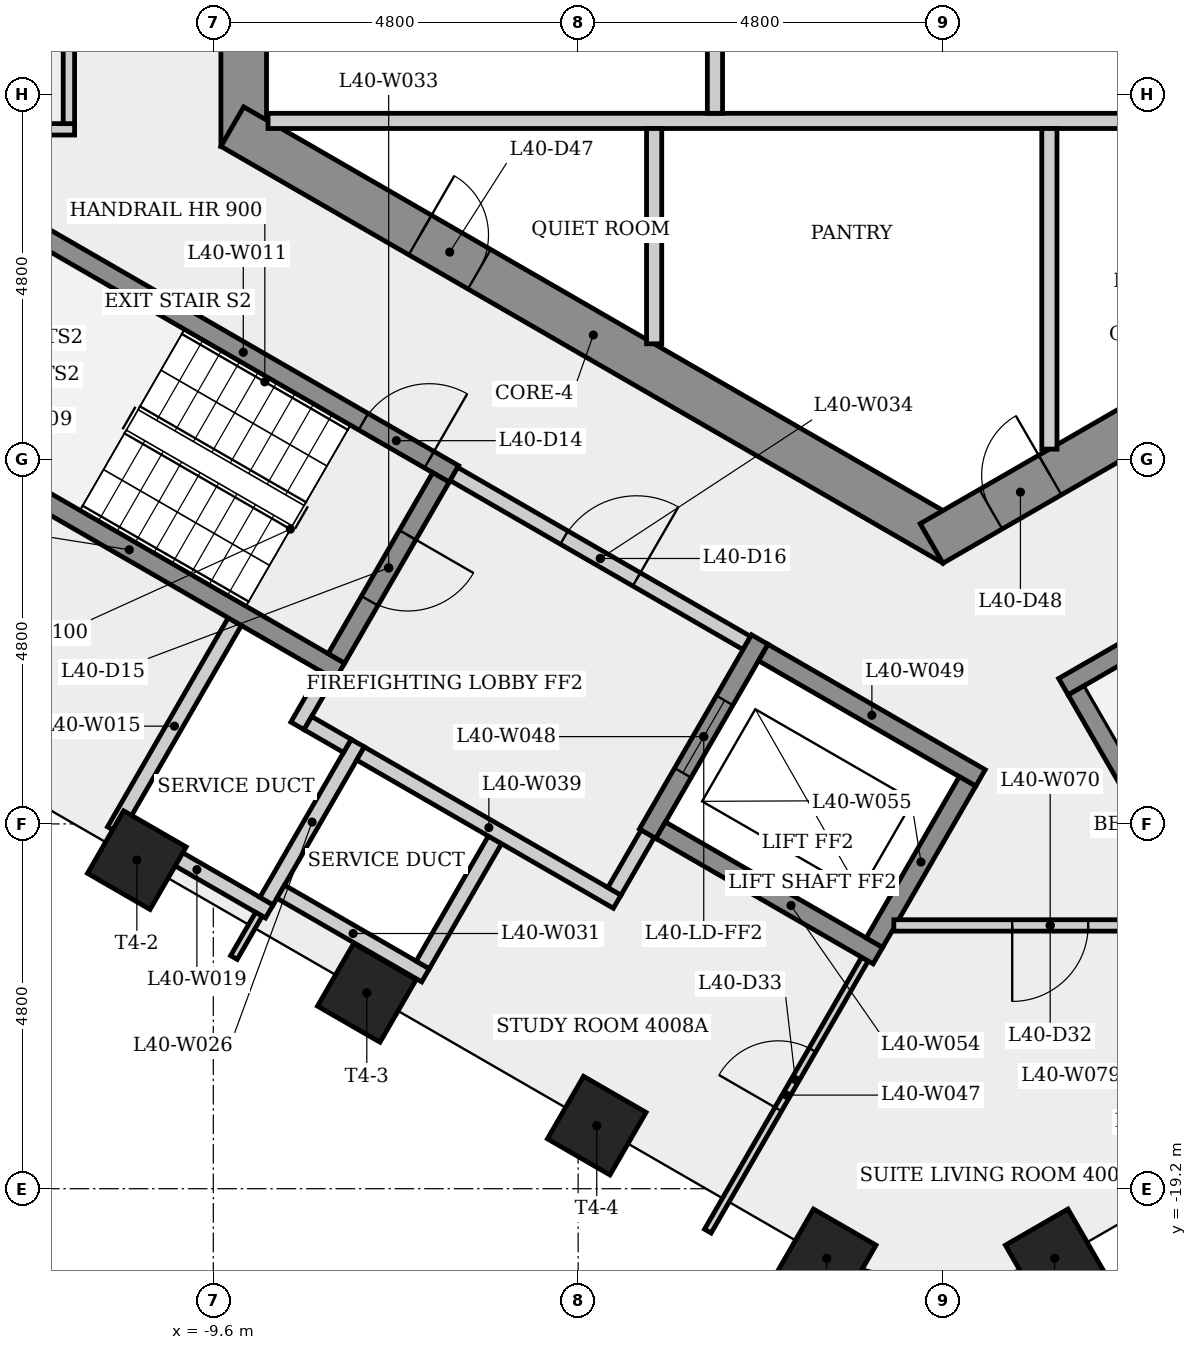
"""IFC4 building model, lengths in metres.
Left out: names, types, materials, properties, quantities, classifications, styles, units other than length and angle.
Written with IfcOpenShell. Run it as: python <this file> out.ifc"""

import sys

from ifc_helpers import new_model, si_unit, direction, frame, frame_2d, origin, origin_2d, place, context, subcontext, project, spatial, rectangle, extrude, element, fill, save


model = new_model("IFC4")
c1 = context("Model", 3, precision=1e-05, world=origin(), true_north=direction((0.0, 1.0)))
c2 = subcontext(c1, "Body", "Model", "MODEL_VIEW")
j1 = project(units=[si_unit("LENGTHUNIT", "METRE"), si_unit("PLANEANGLEUNIT", "RADIAN")], contexts=[c1])
p1 = place(None, origin())
s1 = spatial("IfcSite", under=j1, at=p1, CompositionType="ELEMENT")
p2 = place(p1, origin())
s2 = spatial("IfcBuilding", under=s1, at=p2, CompositionType="ELEMENT")
p3 = place(p2, frame((0.0, 0.0, 152.7)))
s3 = spatial("IfcBuildingStorey", under=s2, at=p3, CompositionType="ELEMENT", Elevation=152.7)
p4 = place(p3, frame((-9.2, 5.485, 0.0), z_axis=(0.0, 0.0, 1.0), x_axis=(0.0, -1.0, 0.0)))
e1 = element("IfcWall", 1, at=p4, inside=s3, PredefinedType="SHEAR", context=c2, shape_type="SweptSolid", body=[
    extrude(rectangle(XDim=10.97, YDim=0.6, at=frame_2d((5.485, 0.0))), origin(), (0.0, 0.0, 1.0), 3.4),
])
p5 = place(p4, frame((8.516, 0.0, 0.0)))
e2 = element("IfcOpeningElement", 2, at=p5, cuts=e1, PredefinedType="OPENING", context=c2, shape_type="SweptSolid", body=[
    extrude(rectangle(XDim=0.9, YDim=2.1, at=frame_2d((0.45, 1.05))), frame((0.0, 0.31, 0.0), z_axis=(0.0, -1.0, 0.0), x_axis=(1.0, 0.0, 0.0)), (0.0, 0.0, 1.0), 0.62),
])
p6 = place(p4, frame((4.685, 0.0, 0.0)))
e3 = element("IfcOpeningElement", 3, at=p6, cuts=e1, PredefinedType="OPENING", context=c2, shape_type="SweptSolid", body=[
    extrude(rectangle(XDim=1.6, YDim=2.1, at=frame_2d((0.8, 1.05))), frame((0.0, 0.31, 0.0), z_axis=(0.0, -1.0, 0.0), x_axis=(1.0, 0.0, 0.0)), (0.0, 0.0, 1.0), 0.62),
])
p7 = place(p3, frame((-9.35, -5.225, 0.0), z_axis=(0.0, 0.0, 1.0), x_axis=(0.866023993627, -0.500002442456, 0.0)))
e4 = element("IfcWall", 4, at=p7, inside=s3, PredefinedType="SHEAR", context=c2, shape_type="SweptSolid", body=[
    extrude(rectangle(XDim=10.97, YDim=0.6, at=frame_2d((5.485, 0.0))), origin(), (0.0, 0.0, 1.0), 3.4),
])
p8 = place(p7, frame((2.853, 0.0, 0.0)))
e5 = element("IfcOpeningElement", 5, at=p8, cuts=e4, PredefinedType="OPENING", context=c2, shape_type="SweptSolid", body=[
    extrude(rectangle(XDim=0.9, YDim=2.1, at=frame_2d((0.45, 1.05))), frame((0.0, 0.31, 0.0), z_axis=(0.0, -1.0, 0.0), x_axis=(1.0, 0.0, 0.0)), (0.0, 0.0, 1.0), 0.62),
])
p9 = place(p3, frame((-0.15, -10.71, 0.0), z_axis=(0.0, 0.0, 1.0), x_axis=(0.866023993627, 0.500002442456, 0.0)))
e6 = element("IfcWall", 6, at=p9, inside=s3, PredefinedType="SHEAR", context=c2, shape_type="SweptSolid", body=[
    extrude(rectangle(XDim=10.97, YDim=0.6, at=frame_2d((5.485, 0.0))), origin(), (0.0, 0.0, 1.0), 3.4),
])
p10 = place(p9, frame((0.9, 0.0, 0.0)))
e7 = element("IfcOpeningElement", 7, at=p10, cuts=e6, PredefinedType="OPENING", context=c2, shape_type="SweptSolid", body=[
    extrude(rectangle(XDim=0.9, YDim=2.1, at=frame_2d((0.45, 1.05))), frame((0.0, 0.31, 0.0), z_axis=(0.0, -1.0, 0.0), x_axis=(1.0, 0.0, 0.0)), (0.0, 0.0, 1.0), 0.62),
])
p11 = place(p9, frame((7.512, 0.0, 0.0)))
e8 = element("IfcOpeningElement", 8, at=p11, cuts=e6, PredefinedType="OPENING", context=c2, shape_type="SweptSolid", body=[
    extrude(rectangle(XDim=0.9, YDim=2.1, at=frame_2d((0.45, 1.05))), frame((0.0, 0.31, 0.0), z_axis=(0.0, -1.0, 0.0), x_axis=(1.0, 0.0, 0.0)), (0.0, 0.0, 1.0), 0.62),
])
for number, where, z_axis, x_axis in (
    (9, (-10.606, -14.877, 0.0), (0.0, 0.0, 1.0), (-0.5, -0.866, 0.0)),
    (10, (-7.581, -16.623, 0.0), (0.0, 0.0, 1.0), (-0.5, -0.866, 0.0)),
    (11, (-4.555, -18.37, 0.0), (0.0, 0.0, 1.0), (-0.5, -0.866, 0.0)),
    (12, (-1.53, -20.117, 0.0), (0.0, 0.0, 1.0), (-0.5, -0.866, 0.0)),
    (13, (1.47, -20.117, 0.0), (0.0, 0.0, 1.0), (0.5, -0.866, 0.0)),
):
    element("IfcColumn", number, at=place(p3, frame(where, z_axis=z_axis, x_axis=x_axis)), inside=s3, PredefinedType="COLUMN", context=c2, shape_type="SweptSolid", body=[
        extrude(rectangle(XDim=0.95, YDim=0.95, at=origin_2d()), origin(), (0.0, 0.0, 1.0), 3.4),
    ])
p12 = place(p3, frame((-15.901, -5.261, 0.0), z_axis=(0.0, 0.0, 1.0), x_axis=(1.0, 0.0, 0.0)))
e14 = element("IfcWall", 14, at=p12, inside=s3, PredefinedType="PARTITIONING", context=c2, shape_type="SweptSolid", body=[
    extrude(rectangle(XDim=4.476, YDim=0.15, at=frame_2d((2.238, 0.0))), origin(), (0.0, 0.0, 1.0), 3.05),
])
p13 = place(p3, frame((-11.977, -6.595, 0.0), z_axis=(0.0, 0.0, 1.0), x_axis=(0.866025499775, -0.499999833739, 0.0)))
e15 = element("IfcWall", 15, at=p13, inside=s3, PredefinedType="SHEAR", context=c2, shape_type="SweptSolid", body=[
    extrude(rectangle(XDim=6.4, YDim=0.25, at=frame_2d((3.2, 0.0))), origin(), (0.0, 0.0, 1.0), 3.05),
])
p14 = place(p13, frame((5.025, 0.0, 0.0)))
e16 = element("IfcOpeningElement", 16, at=p14, cuts=e15, PredefinedType="OPENING", context=c2, shape_type="SweptSolid", body=[
    extrude(rectangle(XDim=1.0, YDim=2.1, at=frame_2d((0.5, 1.05))), frame((0.0, 0.135, 0.0), z_axis=(0.0, -1.0, 0.0), x_axis=(1.0, 0.0, 0.0)), (0.0, 0.0, 1.0), 0.27),
])
p15 = place(p3, frame((-11.5, -5.186, 0.0), z_axis=(0.0, 0.0, 1.0), x_axis=(0.0, 1.0, 0.0)))
e17 = element("IfcWall", 17, at=p15, inside=s3, PredefinedType="PARTITIONING", context=c2, shape_type="SweptSolid", body=[
    extrude(rectangle(XDim=10.521, YDim=0.15, at=frame_2d((5.261, 0.0))), origin(), (0.0, 0.0, 1.0), 3.05),
])
p16 = place(p15, frame((9.146, 0.0, 0.0)))
e18 = element("IfcOpeningElement", 18, at=p16, cuts=e17, PredefinedType="OPENING", context=c2, shape_type="SweptSolid", body=[
    extrude(rectangle(XDim=0.9, YDim=2.1, at=frame_2d((0.45, 1.05))), frame((0.0, 0.085, 0.0), z_axis=(0.0, -1.0, 0.0), x_axis=(1.0, 0.0, 0.0)), (0.0, 0.0, 1.0), 0.17),
])
p17 = place(p15, frame((2.955, 0.0, 0.0)))
e19 = element("IfcOpeningElement", 19, at=p17, cuts=e17, PredefinedType="OPENING", context=c2, shape_type="SweptSolid", body=[
    extrude(rectangle(XDim=1.0, YDim=2.1, at=frame_2d((0.5, 1.05))), frame((0.0, 0.085, 0.0), z_axis=(0.0, -1.0, 0.0), x_axis=(1.0, 0.0, 0.0)), (0.0, 0.0, 1.0), 0.17),
])
p18 = place(p3, frame((-10.905, -14.489, 0.0), z_axis=(0.0, 0.0, 1.0), x_axis=(0.499959856469, 0.866048579423, 0.0)))
e20 = element("IfcWall", 20, at=p18, inside=s3, PredefinedType="PLUMBINGWALL", context=c2, shape_type="SweptSolid", body=[
    extrude(rectangle(XDim=3.175, YDim=0.2, at=frame_2d((1.587, 0.0))), origin(), (0.0, 0.0, 1.0), 3.05),
])
p19 = place(p3, frame((-13.477, -9.193, 0.0), z_axis=(0.0, 0.0, 1.0), x_axis=(0.866025499775, -0.499999833739, 0.0)))
e21 = element("IfcWall", 21, at=p19, inside=s3, PredefinedType="SHEAR", context=c2, shape_type="SweptSolid", body=[
    extrude(rectangle(XDim=6.4, YDim=0.25, at=frame_2d((3.2, 0.0))), origin(), (0.0, 0.0, 1.0), 3.05),
])
p20 = place(p3, frame((-8.863, -15.552, 0.0), z_axis=(0.0, 0.0, 1.0), x_axis=(-0.866035918664, 0.499981787252, 0.0)))
e22 = element("IfcWall", 22, at=p20, inside=s3, PredefinedType="PLUMBINGWALL", context=c2, shape_type="SweptSolid", body=[
    extrude(rectangle(XDim=2.2, YDim=0.2, at=frame_2d((1.1, 0.0))), origin(), (0.0, 0.0, 1.0), 3.05),
])
p21 = place(p3, frame((-9.0, -15.588, 0.0), z_axis=(0.0, 0.0, 1.0), x_axis=(-0.500011643316, -0.866018681408, 0.0)))
e23 = element("IfcWall", 23, at=p21, inside=s3, PredefinedType="PARTITIONING", context=c2, shape_type="SweptSolid", body=[
    extrude(rectangle(XDim=0.658, YDim=0.1, at=frame_2d((0.329, 0.0))), origin(), (0.0, 0.0, 1.0), 3.05),
])
p22 = place(p3, frame((-8.88, -5.15, 0.0), z_axis=(0.0, 0.0, 1.0), x_axis=(1.0, 0.0, 0.0)))
e24 = element("IfcWall", 24, at=p22, inside=s3, PredefinedType="PARTITIONING", context=c2, shape_type="SweptSolid", body=[
    extrude(rectangle(XDim=11.205, YDim=0.2, at=frame_2d((5.603, 0.0))), origin(), (0.0, 0.0, 1.0), 3.05),
])
p23 = place(p3, frame((-8.493, -13.11, 0.0), z_axis=(0.0, 0.0, 1.0), x_axis=(0.500067724834, 0.865986299303, 0.0)))
e25 = element("IfcWall", 25, at=p23, inside=s3, PredefinedType="PLUMBINGWALL", context=c2, shape_type="SweptSolid", body=[
    extrude(rectangle(XDim=0.775, YDim=0.2, at=frame_2d((0.388, 0.0))), origin(), (0.0, 0.0, 1.0), 3.05),
])
p24 = place(p3, frame((-7.7, -13.337, 0.0), z_axis=(0.0, 0.0, 1.0), x_axis=(-0.500001309137, -0.866024647952, 0.0)))
e26 = element("IfcWall", 26, at=p24, inside=s3, PredefinedType="PLUMBINGWALL", context=c2, shape_type="SweptSolid", body=[
    extrude(rectangle(XDim=2.4, YDim=0.2, at=frame_2d((1.2, 0.0))), origin(), (0.0, 0.0, 1.0), 3.05),
])
p25 = place(p3, frame((-7.836, -13.373, 0.0), z_axis=(0.0, 0.0, 1.0), x_axis=(-0.866232998003, 0.499640263761, 0.0)))
e27 = element("IfcWall", 27, at=p25, inside=s3, PredefinedType="PLUMBINGWALL", context=c2, shape_type="SweptSolid", body=[
    extrude(rectangle(XDim=0.6, YDim=0.2, at=frame_2d((0.3, 0.0))), origin(), (0.0, 0.0, 1.0), 3.05),
])
p26 = place(p3, frame((-6.808, -16.392, 0.0), z_axis=(0.0, 0.0, 1.0), x_axis=(-0.866008176907, 0.50002983664, 0.0)))
e28 = element("IfcWall", 28, at=p26, inside=s3, PredefinedType="PLUMBINGWALL", context=c2, shape_type="SweptSolid", body=[
    extrude(rectangle(XDim=2.2, YDim=0.2, at=frame_2d((1.1, 0.0))), origin(), (0.0, 0.0, 1.0), 3.05),
])
p27 = place(p3, frame((-6.605, -9.841, 0.0), z_axis=(0.0, 0.0, 1.0), x_axis=(-0.499996545922, -0.866027397988, 0.0)))
e29 = element("IfcWall", 29, at=p27, inside=s3, PredefinedType="SHEAR", context=c2, shape_type="SweptSolid", body=[
    extrude(rectangle(XDim=2.75, YDim=0.25, at=frame_2d((1.375, 0.0))), origin(), (0.0, 0.0, 1.0), 3.05),
])
p28 = place(p27, frame((0.875, 0.0, 0.0)))
e30 = element("IfcOpeningElement", 30, at=p28, cuts=e29, PredefinedType="OPENING", context=c2, shape_type="SweptSolid", body=[
    extrude(rectangle(XDim=1.0, YDim=2.1, at=frame_2d((0.5, 1.05))), frame((0.0, 0.135, 0.0), z_axis=(0.0, -1.0, 0.0), x_axis=(1.0, 0.0, 0.0)), (0.0, 0.0, 1.0), 0.27),
])
p29 = place(p3, frame((-6.435, -9.795, 0.0), z_axis=(0.0, 0.0, 1.0), x_axis=(0.866012907634, -0.500021643343, 0.0)))
e31 = element("IfcWall", 31, at=p29, inside=s3, PredefinedType="PARTITIONING", context=c2, shape_type="SweptSolid", body=[
    extrude(rectangle(XDim=4.45, YDim=0.2, at=frame_2d((2.225, 0.0))), origin(), (0.0, 0.0, 1.0), 3.05),
])
p30 = place(p29, frame((1.675, 0.0, 0.0)))
e32 = element("IfcOpeningElement", 32, at=p30, cuts=e31, PredefinedType="OPENING", context=c2, shape_type="SweptSolid", body=[
    extrude(rectangle(XDim=1.1, YDim=2.1, at=frame_2d((0.55, 1.05))), frame((0.0, 0.11, 0.0), z_axis=(0.0, -1.0, 0.0), x_axis=(1.0, 0.0, 0.0)), (0.0, 0.0, 1.0), 0.22),
])
p31 = place(p3, frame((-5.895, -14.61, 0.0), z_axis=(0.0, 0.0, 1.0), x_axis=(-0.500022797313, -0.86601224135, 0.0)))
e33 = element("IfcWall", 33, at=p31, inside=s3, PredefinedType="PLUMBINGWALL", context=c2, shape_type="SweptSolid", body=[
    extrude(rectangle(XDim=1.9, YDim=0.2, at=frame_2d((0.95, 0.0))), origin(), (0.0, 0.0, 1.0), 3.05),
])
p32 = place(p3, frame((-4.286, -15.423, 0.0), z_axis=(0.0, 0.0, 1.0), x_axis=(-0.866042777325, 0.499969906938, 0.0)))
e34 = element("IfcWall", 34, at=p32, inside=s3, PredefinedType="PARTITIONING", context=c2, shape_type="SweptSolid", body=[
    extrude(rectangle(XDim=3.9, YDim=0.2, at=frame_2d((1.95, 0.0))), origin(), (0.0, 0.0, 1.0), 3.05),
])
p33 = place(p3, frame((-3.885, -14.529, 0.0), z_axis=(0.0, 0.0, 1.0), x_axis=(-0.499859285417, -0.866106630146, 0.0)))
e35 = element("IfcWall", 35, at=p33, inside=s3, PredefinedType="PARTITIONING", context=c2, shape_type="SweptSolid", body=[
    extrude(rectangle(XDim=0.875, YDim=0.2, at=frame_2d((0.438, 0.0))), origin(), (0.0, 0.0, 1.0), 3.05),
])
p34 = place(p3, frame((-3.8, -5.25, 0.0), z_axis=(0.0, 0.0, 1.0), x_axis=(0.0, -1.0, 0.0)))
e36 = element("IfcWall", 36, at=p34, inside=s3, PredefinedType="PARTITIONING", context=c2, shape_type="SweptSolid", body=[
    extrude(rectangle(XDim=2.833, YDim=0.2, at=frame_2d((1.417, 0.0))), origin(), (0.0, 0.0, 1.0), 3.05),
])
p35 = place(p3, frame((-3.0, -1.9, 0.0), z_axis=(0.0, 0.0, 1.0), x_axis=(0.0, -1.0, 0.0)))
e37 = element("IfcWall", 37, at=p35, inside=s3, PredefinedType="PARTITIONING", context=c2, shape_type="SweptSolid", body=[
    extrude(rectangle(XDim=3.15, YDim=0.2, at=frame_2d((1.575, 0.0))), origin(), (0.0, 0.0, 1.0), 3.05),
])
p36 = place(p3, frame((-3.094, -19.758, 0.0), z_axis=(0.0, 0.0, 1.0), x_axis=(0.500027577057, 0.866009481578, 0.0)))
e38 = element("IfcWall", 38, at=p36, inside=s3, PredefinedType="PARTITIONING", context=c2, shape_type="SweptSolid", body=[
    extrude(rectangle(XDim=4.133, YDim=0.1, at=frame_2d((2.066, 0.0))), origin(), (0.0, 0.0, 1.0), 3.05),
])
p37 = place(p36, frame((1.852, 0.0, 0.0)))
e39 = element("IfcOpeningElement", 39, at=p37, cuts=e38, PredefinedType="OPENING", context=c2, shape_type="SweptSolid", body=[
    extrude(rectangle(XDim=0.9, YDim=2.1, at=frame_2d((0.45, 1.05))), frame((0.0, 0.06, 0.0), z_axis=(0.0, -1.0, 0.0), x_axis=(1.0, 0.0, 0.0)), (0.0, 0.0, 1.0), 0.12),
])
p38 = place(p3, frame((-2.41, -11.974, 0.0), z_axis=(0.0, 0.0, 1.0), x_axis=(-0.500001826776, -0.866024349092, 0.0)))
e40 = element("IfcWall", 40, at=p38, inside=s3, PredefinedType="SHEAR", context=c2, shape_type="SweptSolid", body=[
    extrude(rectangle(XDim=2.95, YDim=0.25, at=frame_2d((1.475, 0.0))), origin(), (0.0, 0.0, 1.0), 3.05),
])
p39 = place(p38, frame((0.925, 0.0, 0.0)))
e41 = element("IfcOpeningElement", 41, at=p39, cuts=e40, PredefinedType="OPENING", context=c2, shape_type="SweptSolid", body=[
    extrude(rectangle(XDim=1.1, YDim=2.1, at=frame_2d((0.55, 1.05))), frame((0.0, 0.135, 0.0), z_axis=(0.0, -1.0, 0.0), x_axis=(1.0, 0.0, 0.0)), (0.0, 0.0, 1.0), 0.27),
])
p40 = place(p3, frame((-2.364, -12.145, 0.0), z_axis=(0.0, 0.0, 1.0), x_axis=(0.866040211805, -0.499974350878, 0.0)))
e42 = element("IfcWall", 42, at=p40, inside=s3, PredefinedType="SHEAR", context=c2, shape_type="SweptSolid", body=[
    extrude(rectangle(XDim=3.3, YDim=0.25, at=frame_2d((1.65, 0.0))), origin(), (0.0, 0.0, 1.0), 3.05),
])
p41 = place(p3, frame((-0.856, -16.133, 0.0), z_axis=(0.0, 0.0, 1.0), x_axis=(-0.866021716278, 0.500006386895, 0.0)))
e43 = element("IfcWall", 43, at=p41, inside=s3, PredefinedType="SHEAR", context=c2, shape_type="SweptSolid", body=[
    extrude(rectangle(XDim=3.3, YDim=0.25, at=frame_2d((1.65, 0.0))), origin(), (0.0, 0.0, 1.0), 3.05),
])
p42 = place(p3, frame((-0.902, -15.962, 0.0), z_axis=(0.0, 0.0, 1.0), x_axis=(0.500061746146, 0.865989751695, 0.0)))
e44 = element("IfcWall", 44, at=p42, inside=s3, PredefinedType="SHEAR", context=c2, shape_type="SweptSolid", body=[
    extrude(rectangle(XDim=2.45, YDim=0.25, at=frame_2d((1.225, 0.0))), origin(), (0.0, 0.0, 1.0), 3.4),
])
p43 = place(p3, frame((1.4, -5.25, 0.0), z_axis=(0.0, 0.0, 1.0), x_axis=(0.0, -1.0, 0.0)))
e45 = element("IfcWall", 45, at=p43, inside=s3, PredefinedType="PARTITIONING", context=c2, shape_type="SweptSolid", body=[
    extrude(rectangle(XDim=4.219, YDim=0.2, at=frame_2d((2.109, 0.0))), origin(), (0.0, 0.0, 1.0), 3.05),
])
p44 = place(p3, frame((1.585, -12.595, 0.0), z_axis=(0.0, 0.0, 1.0), x_axis=(0.866036417653, 0.499980922934, 0.0)))
e46 = element("IfcWall", 46, at=p44, inside=s3, PredefinedType="SHEAR", context=c2, shape_type="SweptSolid", body=[
    extrude(rectangle(XDim=6.65, YDim=0.25, at=frame_2d((3.325, 0.0))), origin(), (0.0, 0.0, 1.0), 3.05),
])
p45 = place(p44, frame((5.275, 0.0, 0.0)))
e47 = element("IfcOpeningElement", 47, at=p45, cuts=e46, PredefinedType="OPENING", context=c2, shape_type="SweptSolid", body=[
    extrude(rectangle(XDim=1.0, YDim=2.1, at=frame_2d((0.5, 1.05))), frame((0.0, 0.135, 0.0), z_axis=(0.0, -1.0, 0.0), x_axis=(1.0, 0.0, 0.0)), (0.0, 0.0, 1.0), 0.27),
])
p46 = place(p3, frame((3.256, -15.239, 0.0), z_axis=(0.0, 0.0, 1.0), x_axis=(-0.50002537861, 0.866010750942, 0.0)))
e48 = element("IfcWall", 48, at=p46, inside=s3, PredefinedType="SHEAR", context=c2, shape_type="SweptSolid", body=[
    extrude(rectangle(XDim=3.0, YDim=0.25, at=frame_2d((1.5, 0.0))), origin(), (0.0, 0.0, 1.0), 3.05),
])
p47 = place(p3, frame((3.468, -15.736, 0.0), z_axis=(0.0, 0.0, 1.0), x_axis=(-1.0, 0.0, 0.0)))
e49 = element("IfcWall", 49, at=p47, inside=s3, PredefinedType="PARTITIONING", context=c2, shape_type="SweptSolid", body=[
    extrude(rectangle(XDim=4.114, YDim=0.15, at=frame_2d((2.057, 0.0))), origin(), (0.0, 0.0, 1.0), 3.05),
])
p48 = place(p47, frame((1.557, 0.0, 0.0)))
e50 = element("IfcOpeningElement", 50, at=p48, cuts=e49, PredefinedType="OPENING", context=c2, shape_type="SweptSolid", body=[
    extrude(rectangle(XDim=1.0, YDim=2.1, at=frame_2d((0.5, 1.05))), frame((0.0, 0.085, 0.0), z_axis=(0.0, -1.0, 0.0), x_axis=(1.0, 0.0, 0.0)), (0.0, 0.0, 1.0), 0.17),
])
p49 = place(p14, origin())
e51 = element("IfcDoor", 51, at=p49, inside=s3, OperationType="SINGLE_SWING_RIGHT", PredefinedType="DOOR", context=c2, shape_type="SweptSolid", body=[
    extrude(rectangle(XDim=1.0, YDim=2.1, at=frame_2d((0.5, 1.05))), frame((0.0, 0.025, 0.0), z_axis=(0.0, -1.0, 0.0), x_axis=(1.0, 0.0, 0.0)), (0.0, 0.0, 1.0), 0.05),
])
fill(e16, e51)
p50 = place(p28, origin())
e52 = element("IfcDoor", 52, at=p50, inside=s3, OperationType="SINGLE_SWING_LEFT", PredefinedType="DOOR", context=c2, shape_type="SweptSolid", body=[
    extrude(rectangle(XDim=1.0, YDim=2.1, at=frame_2d((0.5, 1.05))), frame((0.0, 0.025, 0.0), z_axis=(0.0, -1.0, 0.0), x_axis=(1.0, 0.0, 0.0)), (0.0, 0.0, 1.0), 0.05),
])
fill(e30, e52)
p51 = place(p30, origin())
e53 = element("IfcDoor", 53, at=p51, inside=s3, OperationType="SINGLE_SWING_RIGHT", PredefinedType="DOOR", context=c2, shape_type="SweptSolid", body=[
    extrude(rectangle(XDim=1.1, YDim=2.1, at=frame_2d((0.55, 1.05))), frame((0.0, 0.025, 0.0), z_axis=(0.0, -1.0, 0.0), x_axis=(1.0, 0.0, 0.0)), (0.0, 0.0, 1.0), 0.05),
])
fill(e32, e53)
p52 = place(p39, origin())
e54 = element("IfcDoor", 54, at=p52, inside=s3, OperationType="SLIDING_TO_LEFT", PredefinedType="DOOR", context=c2, shape_type="SweptSolid", body=[
    extrude(rectangle(XDim=1.1, YDim=2.1, at=frame_2d((0.55, 1.05))), frame((0.0, 0.025, 0.0), z_axis=(0.0, -1.0, 0.0), x_axis=(1.0, 0.0, 0.0)), (0.0, 0.0, 1.0), 0.05),
])
fill(e41, e54)
p53 = place(p48, origin())
e55 = element("IfcDoor", 55, at=p53, inside=s3, OperationType="SINGLE_SWING_RIGHT", PredefinedType="DOOR", context=c2, shape_type="SweptSolid", body=[
    extrude(rectangle(XDim=1.0, YDim=2.1, at=frame_2d((0.5, 1.05))), frame((0.0, 0.025, 0.0), z_axis=(0.0, -1.0, 0.0), x_axis=(1.0, 0.0, 0.0)), (0.0, 0.0, 1.0), 0.05),
])
fill(e50, e55)
p54 = place(p37, origin())
e56 = element("IfcDoor", 56, at=p54, inside=s3, OperationType="SINGLE_SWING_LEFT", PredefinedType="DOOR", context=c2, shape_type="SweptSolid", body=[
    extrude(rectangle(XDim=0.9, YDim=2.1, at=frame_2d((0.45, 1.05))), frame((0.0, 0.025, 0.0), z_axis=(0.0, -1.0, 0.0), x_axis=(1.0, 0.0, 0.0)), (0.0, 0.0, 1.0), 0.05),
])
fill(e39, e56)
p55 = place(p8, origin())
e57 = element("IfcDoor", 57, at=p55, inside=s3, OperationType="SINGLE_SWING_LEFT", PredefinedType="DOOR", context=c2, shape_type="SweptSolid", body=[
    extrude(rectangle(XDim=0.9, YDim=2.1, at=frame_2d((0.45, 1.05))), frame((0.0, 0.025, 0.0), z_axis=(0.0, -1.0, 0.0), x_axis=(1.0, 0.0, 0.0)), (0.0, 0.0, 1.0), 0.05),
])
fill(e5, e57)
p56 = place(p10, origin())
e58 = element("IfcDoor", 58, at=p56, inside=s3, OperationType="SINGLE_SWING_RIGHT", PredefinedType="DOOR", context=c2, shape_type="SweptSolid", body=[
    extrude(rectangle(XDim=0.9, YDim=2.1, at=frame_2d((0.45, 1.05))), frame((0.0, 0.025, 0.0), z_axis=(0.0, -1.0, 0.0), x_axis=(1.0, 0.0, 0.0)), (0.0, 0.0, 1.0), 0.05),
])
fill(e7, e58)
save(model, sys.argv[1])
